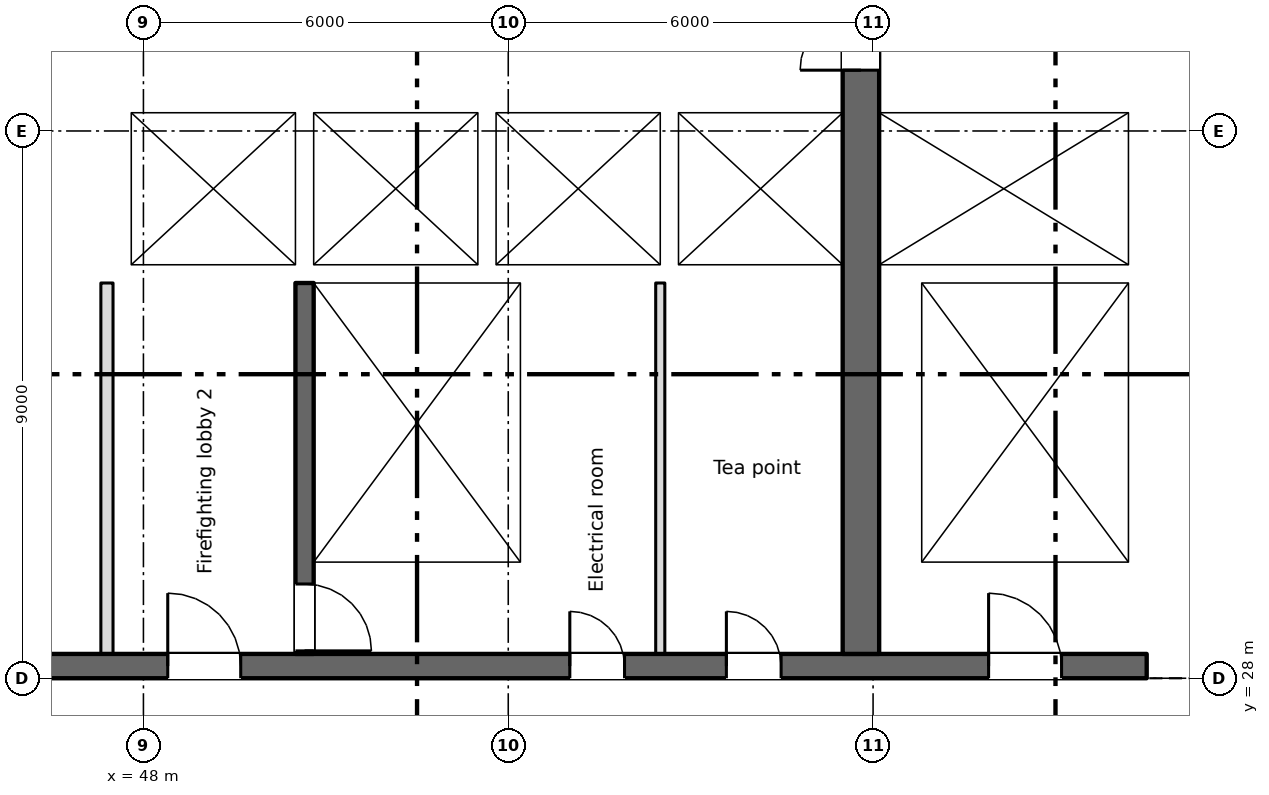
"""IFC4 building model, lengths in metres.
Left out: names, types, materials, properties, quantities, classifications, styles, units other than length and angle.
Written with IfcOpenShell. Run it as: python <this file> out.ifc"""

import sys

from ifc_helpers import new_model, si_unit, direction, frame, frame_2d, origin, place, context, subcontext, project, spatial, rectangle, extrude, element, fill, save


model = new_model("IFC4")
c1 = context("Model", 3, precision=1e-05, world=origin(), true_north=direction((0.0, 1.0)))
c2 = subcontext(c1, "Body", "Model", "MODEL_VIEW")
j1 = project(units=[si_unit("LENGTHUNIT", "METRE"), si_unit("PLANEANGLEUNIT", "RADIAN")], contexts=[c1])
p1 = place(None, origin())
s1 = spatial("IfcSite", under=j1, at=p1, CompositionType="ELEMENT")
p2 = place(p1, origin())
s2 = spatial("IfcBuilding", under=s1, at=p2, CompositionType="ELEMENT")
p3 = place(p2, frame((0.0, 0.0, 235.55)))
s3 = spatial("IfcBuildingStorey", under=s2, at=p3, CompositionType="ELEMENT", Elevation=235.55)
p4 = place(p3, frame((6.5, 28.2, 0.0), z_axis=(0.0, 0.0, 1.0), x_axis=(1.0, 0.0, 0.0)))
e1 = element("IfcWall", 1, at=p4, inside=s3, PredefinedType="SHEAR", context=c2, shape_type="SweptSolid", body=[
    extrude(rectangle(XDim=58.0, YDim=0.4, at=frame_2d((29.0, 0.0))), origin(), (0.0, 0.0, 1.0), 3.4),
])
p5 = place(p4, frame((13.012, 0.0, 0.0)))
e2 = element("IfcOpeningElement", 2, at=p5, cuts=e1, PredefinedType="OPENING", context=c2, shape_type="SweptSolid", body=[
    extrude(rectangle(XDim=0.9, YDim=2.1, at=frame_2d((0.45, 1.05))), frame((0.0, 0.21, 0.0), z_axis=(0.0, -1.0, 0.0), x_axis=(1.0, 0.0, 0.0)), (0.0, 0.0, 1.0), 0.42),
])
p6 = place(p4, frame((15.587, 0.0, 0.0)))
e3 = element("IfcOpeningElement", 3, at=p6, cuts=e1, PredefinedType="OPENING", context=c2, shape_type="SweptSolid", body=[
    extrude(rectangle(XDim=0.9, YDim=2.1, at=frame_2d((0.45, 1.05))), frame((0.0, 0.21, 0.0), z_axis=(0.0, -1.0, 0.0), x_axis=(1.0, 0.0, 0.0)), (0.0, 0.0, 1.0), 0.42),
])
p7 = place(p4, frame((48.512, 0.0, 0.0)))
e4 = element("IfcOpeningElement", 4, at=p7, cuts=e1, PredefinedType="OPENING", context=c2, shape_type="SweptSolid", body=[
    extrude(rectangle(XDim=0.9, YDim=2.1, at=frame_2d((0.45, 1.05))), frame((0.0, 0.21, 0.0), z_axis=(0.0, -1.0, 0.0), x_axis=(1.0, 0.0, 0.0)), (0.0, 0.0, 1.0), 0.42),
])
p8 = place(p4, frame((51.087, 0.0, 0.0)))
e5 = element("IfcOpeningElement", 5, at=p8, cuts=e1, PredefinedType="OPENING", context=c2, shape_type="SweptSolid", body=[
    extrude(rectangle(XDim=0.9, YDim=2.1, at=frame_2d((0.45, 1.05))), frame((0.0, 0.21, 0.0), z_axis=(0.0, -1.0, 0.0), x_axis=(1.0, 0.0, 0.0)), (0.0, 0.0, 1.0), 0.42),
])
p9 = place(p4, frame((0.762, 0.0, 0.0)))
e6 = element("IfcOpeningElement", 6, at=p9, cuts=e1, PredefinedType="OPENING", context=c2, shape_type="SweptSolid", body=[
    extrude(rectangle(XDim=0.9, YDim=2.1, at=frame_2d((0.45, 1.05))), frame((0.0, 0.21, 0.0), z_axis=(0.0, -1.0, 0.0), x_axis=(1.0, 0.0, 0.0)), (0.0, 0.0, 1.0), 0.42),
])
p10 = place(p4, frame((2.337, 0.0, 0.0)))
e7 = element("IfcOpeningElement", 7, at=p10, cuts=e1, PredefinedType="OPENING", context=c2, shape_type="SweptSolid", body=[
    extrude(rectangle(XDim=0.9, YDim=2.1, at=frame_2d((0.45, 1.05))), frame((0.0, 0.21, 0.0), z_axis=(0.0, -1.0, 0.0), x_axis=(1.0, 0.0, 0.0)), (0.0, 0.0, 1.0), 0.42),
])
p11 = place(p4, frame((4.9, 0.0, 0.0)))
e8 = element("IfcOpeningElement", 8, at=p11, cuts=e1, PredefinedType="OPENING", context=c2, shape_type="SweptSolid", body=[
    extrude(rectangle(XDim=1.2, YDim=2.1, at=frame_2d((0.6, 1.05))), frame((0.0, 0.21, 0.0), z_axis=(0.0, -1.0, 0.0), x_axis=(1.0, 0.0, 0.0)), (0.0, 0.0, 1.0), 0.42),
])
p12 = place(p4, frame((31.9, 0.0, 0.0)))
e9 = element("IfcOpeningElement", 9, at=p12, cuts=e1, PredefinedType="OPENING", context=c2, shape_type="SweptSolid", body=[
    extrude(rectangle(XDim=1.2, YDim=2.1, at=frame_2d((0.6, 1.05))), frame((0.0, 0.21, 0.0), z_axis=(0.0, -1.0, 0.0), x_axis=(1.0, 0.0, 0.0)), (0.0, 0.0, 1.0), 0.42),
])
p13 = place(p4, frame((55.4, 0.0, 0.0)))
e10 = element("IfcOpeningElement", 10, at=p13, cuts=e1, PredefinedType="OPENING", context=c2, shape_type="SweptSolid", body=[
    extrude(rectangle(XDim=1.2, YDim=2.1, at=frame_2d((0.6, 1.05))), frame((0.0, 0.21, 0.0), z_axis=(0.0, -1.0, 0.0), x_axis=(1.0, 0.0, 0.0)), (0.0, 0.0, 1.0), 0.42),
])
p14 = place(p4, frame((21.9, 0.0, 0.0)))
e11 = element("IfcOpeningElement", 11, at=p14, cuts=e1, PredefinedType="OPENING", context=c2, shape_type="SweptSolid", body=[
    extrude(rectangle(XDim=1.2, YDim=2.1, at=frame_2d((0.6, 1.05))), frame((0.0, 0.21, 0.0), z_axis=(0.0, -1.0, 0.0), x_axis=(1.0, 0.0, 0.0)), (0.0, 0.0, 1.0), 0.42),
])
p15 = place(p4, frame((41.9, 0.0, 0.0)))
e12 = element("IfcOpeningElement", 12, at=p15, cuts=e1, PredefinedType="OPENING", context=c2, shape_type="SweptSolid", body=[
    extrude(rectangle(XDim=1.2, YDim=2.1, at=frame_2d((0.6, 1.05))), frame((0.0, 0.21, 0.0), z_axis=(0.0, -1.0, 0.0), x_axis=(1.0, 0.0, 0.0)), (0.0, 0.0, 1.0), 0.42),
])
p16 = place(p4, frame((25.05, 0.0, 0.0)))
e13 = element("IfcOpeningElement", 13, at=p16, cuts=e1, PredefinedType="OPENING", context=c2, shape_type="SweptSolid", body=[
    extrude(rectangle(XDim=2.4, YDim=2.1, at=frame_2d((1.2, 1.05))), frame((0.0, 0.21, 0.0), z_axis=(0.0, -1.0, 0.0), x_axis=(1.0, 0.0, 0.0)), (0.0, 0.0, 1.0), 0.42),
])
p17 = place(p4, frame((37.55, 0.0, 0.0)))
e14 = element("IfcOpeningElement", 14, at=p17, cuts=e1, PredefinedType="OPENING", context=c2, shape_type="SweptSolid", body=[
    extrude(rectangle(XDim=2.4, YDim=2.1, at=frame_2d((1.2, 1.05))), frame((0.0, 0.21, 0.0), z_axis=(0.0, -1.0, 0.0), x_axis=(1.0, 0.0, 0.0)), (0.0, 0.0, 1.0), 0.42),
])
p18 = place(p4, frame((8.25, 0.0, 0.0)))
e15 = element("IfcOpeningElement", 15, at=p18, cuts=e1, PredefinedType="OPENING", context=c2, shape_type="SweptSolid", body=[
    extrude(rectangle(XDim=2.4, YDim=2.1, at=frame_2d((1.2, 1.05))), frame((0.0, 0.21, 0.0), z_axis=(0.0, -1.0, 0.0), x_axis=(1.0, 0.0, 0.0)), (0.0, 0.0, 1.0), 0.42),
])
p19 = place(p4, frame((29.05, 0.0, 0.0)))
e16 = element("IfcOpeningElement", 16, at=p19, cuts=e1, PredefinedType="OPENING", context=c2, shape_type="SweptSolid", body=[
    extrude(rectangle(XDim=0.9, YDim=2.1, at=frame_2d((0.45, 1.05))), frame((0.0, 0.21, 0.0), z_axis=(0.0, -1.0, 0.0), x_axis=(1.0, 0.0, 0.0)), (0.0, 0.0, 1.0), 0.42),
])
p20 = place(p4, frame((35.05, 0.0, 0.0)))
e17 = element("IfcOpeningElement", 17, at=p20, cuts=e1, PredefinedType="OPENING", context=c2, shape_type="SweptSolid", body=[
    extrude(rectangle(XDim=0.9, YDim=2.1, at=frame_2d((0.45, 1.05))), frame((0.0, 0.21, 0.0), z_axis=(0.0, -1.0, 0.0), x_axis=(1.0, 0.0, 0.0)), (0.0, 0.0, 1.0), 0.42),
])
p21 = place(p3, frame((64.35, 34.8, 0.0), z_axis=(0.0, 0.0, 1.0), x_axis=(0.0, 1.0, 0.0)))
e18 = element("IfcWall", 18, at=p21, inside=s3, PredefinedType="SHEAR", context=c2, shape_type="SweptSolid", body=[
    extrude(rectangle(XDim=6.45, YDim=0.3, at=frame_2d((3.225, 0.0))), origin(), (0.0, 0.0, 1.0), 3.4),
])
p22 = place(p3, frame((59.8, 28.4, 0.0), z_axis=(0.0, 0.0, 1.0), x_axis=(0.0, 1.0, 0.0)))
e19 = element("IfcWall", 19, at=p22, inside=s3, PredefinedType="SHEAR", context=c2, shape_type="SweptSolid", body=[
    extrude(rectangle(XDim=15.1, YDim=0.6, at=frame_2d((7.55, 0.0))), origin(), (0.0, 0.0, 1.0), 3.4),
])
p23 = place(p22, frame((9.6, 0.0, 0.0)))
e20 = element("IfcOpeningElement", 20, at=p23, cuts=e19, PredefinedType="OPENING", context=c2, shape_type="SweptSolid", body=[
    extrude(rectangle(XDim=2.0, YDim=2.1, at=frame_2d((1.0, 1.05))), frame((0.0, 0.31, 0.0), z_axis=(0.0, -1.0, 0.0), x_axis=(1.0, 0.0, 0.0)), (0.0, 0.0, 1.0), 0.62),
])
p24 = place(p3, frame((50.65, 34.5, 0.0), z_axis=(0.0, 0.0, 1.0), x_axis=(0.0, -1.0, 0.0)))
e21 = element("IfcWall", 21, at=p24, inside=s3, PredefinedType="SHEAR", context=c2, shape_type="SweptSolid", body=[
    extrude(rectangle(XDim=6.1, YDim=0.3, at=frame_2d((3.05, 0.0))), origin(), (0.0, 0.0, 1.0), 3.4),
])
p25 = place(p24, frame((4.95, 0.0, 0.0)))
e22 = element("IfcOpeningElement", 22, at=p25, cuts=e21, PredefinedType="OPENING", context=c2, shape_type="SweptSolid", body=[
    extrude(rectangle(XDim=1.1, YDim=2.1, at=frame_2d((0.55, 1.05))), frame((0.0, 0.16, 0.0), z_axis=(0.0, -1.0, 0.0), x_axis=(1.0, 0.0, 0.0)), (0.0, 0.0, 1.0), 0.32),
])
p26 = place(p3, frame((54.35, 28.4, 0.0), z_axis=(0.0, 0.0, 1.0), x_axis=(0.0, 1.0, 0.0)))
e23 = element("IfcWall", 23, at=p26, inside=s3, PredefinedType="SHEAR", context=c2, shape_type="SweptSolid", body=[
    extrude(rectangle(XDim=6.1, YDim=0.3, at=frame_2d((3.05, 0.0))), origin(), (0.0, 0.0, 1.0), 3.4),
])
p27 = place(p3, frame((60.45, 28.4, 0.0), z_axis=(0.0, 0.0, 1.0), x_axis=(0.0, 1.0, 0.0)))
e24 = element("IfcWall", 24, at=p27, inside=s3, PredefinedType="SHEAR", context=c2, shape_type="SweptSolid", body=[
    extrude(rectangle(XDim=6.1, YDim=0.7, at=frame_2d((3.05, 0.0))), origin(), (0.0, 0.0, 1.0), 3.4),
])
p28 = place(p3, frame((64.35, 28.4, 0.0), z_axis=(0.0, 0.0, 1.0), x_axis=(0.0, 1.0, 0.0)))
e25 = element("IfcWall", 25, at=p28, inside=s3, PredefinedType="SHEAR", context=c2, shape_type="SweptSolid", body=[
    extrude(rectangle(XDim=6.1, YDim=0.3, at=frame_2d((3.05, 0.0))), origin(), (0.0, 0.0, 1.0), 3.4),
])
p29 = place(p3, frame((47.3, 34.65, 0.0), z_axis=(0.0, 0.0, 1.0), x_axis=(1.0, 0.0, 0.0)))
e26 = element("IfcWall", 26, at=p29, inside=s3, PredefinedType="SHEAR", context=c2, shape_type="SweptSolid", body=[
    extrude(rectangle(XDim=12.2, YDim=0.3, at=frame_2d((6.1, 0.0))), origin(), (0.0, 0.0, 1.0), 3.4),
])
p30 = place(p29, frame((1.3, 0.0, 0.0)))
e27 = element("IfcOpeningElement", 27, at=p30, cuts=e26, PredefinedType="OPENING", context=c2, shape_type="SweptSolid", body=[
    extrude(rectangle(XDim=1.1, YDim=2.1, at=frame_2d((0.55, 1.05))), frame((0.0, 0.16, 0.0), z_axis=(0.0, -1.0, 0.0), x_axis=(1.0, 0.0, 0.0)), (0.0, 0.0, 1.0), 0.32),
])
p31 = place(p3, frame((60.1, 34.65, 0.0), z_axis=(0.0, 0.0, 1.0), x_axis=(1.0, 0.0, 0.0)))
e28 = element("IfcWall", 28, at=p31, inside=s3, PredefinedType="SHEAR", context=c2, shape_type="SweptSolid", body=[
    extrude(rectangle(XDim=4.4, YDim=0.3, at=frame_2d((2.2, 0.0))), origin(), (0.0, 0.0, 1.0), 3.4),
])
p32 = place(p3, frame((47.3, 37.45, 0.0), z_axis=(0.0, 0.0, 1.0), x_axis=(1.0, 0.0, 0.0)))
e29 = element("IfcWall", 29, at=p32, inside=s3, PredefinedType="SHEAR", context=c2, shape_type="SweptSolid", body=[
    extrude(rectangle(XDim=12.2, YDim=0.3, at=frame_2d((6.1, 0.0))), origin(), (0.0, 0.0, 1.0), 3.4),
])
p33 = place(p32, frame((4.3, 0.0, 0.0)))
e30 = element("IfcOpeningElement", 30, at=p33, cuts=e29, PredefinedType="OPENING", context=c2, shape_type="SweptSolid", body=[
    extrude(rectangle(XDim=1.1, YDim=2.1, at=frame_2d((0.55, 1.05))), frame((0.0, 0.16, 0.0), z_axis=(0.0, -1.0, 0.0), x_axis=(1.0, 0.0, 0.0)), (0.0, 0.0, 1.0), 0.32),
])
p34 = place(p32, frame((7.3, 0.0, 0.0)))
e31 = element("IfcOpeningElement", 31, at=p34, cuts=e29, PredefinedType="OPENING", context=c2, shape_type="SweptSolid", body=[
    extrude(rectangle(XDim=1.1, YDim=2.1, at=frame_2d((0.55, 1.05))), frame((0.0, 0.16, 0.0), z_axis=(0.0, -1.0, 0.0), x_axis=(1.0, 0.0, 0.0)), (0.0, 0.0, 1.0), 0.32),
])
p35 = place(p32, frame((10.3, 0.0, 0.0)))
e32 = element("IfcOpeningElement", 32, at=p35, cuts=e29, PredefinedType="OPENING", context=c2, shape_type="SweptSolid", body=[
    extrude(rectangle(XDim=1.1, YDim=2.1, at=frame_2d((0.55, 1.05))), frame((0.0, 0.16, 0.0), z_axis=(0.0, -1.0, 0.0), x_axis=(1.0, 0.0, 0.0)), (0.0, 0.0, 1.0), 0.32),
])
p36 = place(p3, frame((60.1, 37.45, 0.0), z_axis=(0.0, 0.0, 1.0), x_axis=(1.0, 0.0, 0.0)))
e33 = element("IfcWall", 33, at=p36, inside=s3, PredefinedType="SHEAR", context=c2, shape_type="SweptSolid", body=[
    extrude(rectangle(XDim=4.1, YDim=0.3, at=frame_2d((2.05, 0.0))), origin(), (0.0, 0.0, 1.0), 3.4),
])
p37 = place(p36, frame((1.5, 0.0, 0.0)))
e34 = element("IfcOpeningElement", 34, at=p37, cuts=e33, PredefinedType="OPENING", context=c2, shape_type="SweptSolid", body=[
    extrude(rectangle(XDim=1.1, YDim=2.1, at=frame_2d((0.55, 1.05))), frame((0.0, 0.16, 0.0), z_axis=(0.0, -1.0, 0.0), x_axis=(1.0, 0.0, 0.0)), (0.0, 0.0, 1.0), 0.32),
])
p38 = place(p3, frame((47.55, 34.8, 0.0), z_axis=(0.0, 0.0, 1.0), x_axis=(0.0, 1.0, 0.0)))
e35 = element("IfcWall", 35, at=p38, inside=s3, PredefinedType="SHEAR", context=c2, shape_type="SweptSolid", body=[
    extrude(rectangle(XDim=2.5, YDim=0.5, at=frame_2d((1.25, 0.0))), origin(), (0.0, 0.0, 1.0), 3.4),
])
for number, where, z_axis, x_axis in (
    (36, (50.65, 34.8, 0.0), (0.0, 0.0, 1.0), (0.0, 1.0, 0.0)),
    (37, (53.65, 34.8, 0.0), (0.0, 0.0, 1.0), (0.0, 1.0, 0.0)),
    (38, (56.65, 34.8, 0.0), (0.0, 0.0, 1.0), (0.0, 1.0, 0.0)),
):
    element("IfcWall", number, at=place(p3, frame(where, z_axis=z_axis, x_axis=x_axis)), inside=s3, PredefinedType="SHEAR", context=c2, shape_type="SweptSolid", body=[
        extrude(rectangle(XDim=2.5, YDim=0.3, at=frame_2d((1.25, 0.0))), origin(), (0.0, 0.0, 1.0), 3.4),
    ])
p39 = place(p3, frame((47.4, 28.4, 0.0), z_axis=(0.0, 0.0, 1.0), x_axis=(0.0, 1.0, 0.0)))
e39 = element("IfcWall", 39, at=p39, inside=s3, PredefinedType="PARTITIONING", context=c2, shape_type="SweptSolid", body=[
    extrude(rectangle(XDim=6.1, YDim=0.2, at=frame_2d((3.05, 0.0))), origin(), (0.0, 0.0, 1.0), 3.4),
])
p40 = place(p3, frame((56.5, 28.4, 0.0), z_axis=(0.0, 0.0, 1.0), x_axis=(0.0, 1.0, 0.0)))
e40 = element("IfcWall", 40, at=p40, inside=s3, PredefinedType="PARTITIONING", context=c2, shape_type="SweptSolid", body=[
    extrude(rectangle(XDim=6.1, YDim=0.15, at=frame_2d((3.05, 0.0))), origin(), (0.0, 0.0, 1.0), 3.4),
])
p41 = place(p7, origin())
e41 = element("IfcDoor", 41, at=p41, inside=s3, OperationType="SINGLE_SWING_LEFT", PredefinedType="DOOR", context=c2, shape_type="SweptSolid", body=[
    extrude(rectangle(XDim=0.9, YDim=2.1, at=frame_2d((0.45, 1.05))), frame((0.0, 0.025, 0.0), z_axis=(0.0, -1.0, 0.0), x_axis=(1.0, 0.0, 0.0)), (0.0, 0.0, 1.0), 0.05),
])
fill(e4, e41)
p42 = place(p8, origin())
e42 = element("IfcDoor", 42, at=p42, inside=s3, OperationType="SINGLE_SWING_LEFT", PredefinedType="DOOR", context=c2, shape_type="SweptSolid", body=[
    extrude(rectangle(XDim=0.9, YDim=2.1, at=frame_2d((0.45, 1.05))), frame((0.0, 0.025, 0.0), z_axis=(0.0, -1.0, 0.0), x_axis=(1.0, 0.0, 0.0)), (0.0, 0.0, 1.0), 0.05),
])
fill(e5, e42)
p43 = place(p33, origin())
e43 = element("IfcDoor", 43, at=p43, inside=s3, OperationType="SLIDING_TO_LEFT", PredefinedType="DOOR", context=c2, shape_type="SweptSolid", body=[
    extrude(rectangle(XDim=1.1, YDim=2.1, at=frame_2d((0.55, 1.05))), frame((0.0, 0.025, 0.0), z_axis=(0.0, -1.0, 0.0), x_axis=(1.0, 0.0, 0.0)), (0.0, 0.0, 1.0), 0.05),
])
fill(e30, e43)
p44 = place(p34, origin())
e44 = element("IfcDoor", 44, at=p44, inside=s3, OperationType="SLIDING_TO_LEFT", PredefinedType="DOOR", context=c2, shape_type="SweptSolid", body=[
    extrude(rectangle(XDim=1.1, YDim=2.1, at=frame_2d((0.55, 1.05))), frame((0.0, 0.025, 0.0), z_axis=(0.0, -1.0, 0.0), x_axis=(1.0, 0.0, 0.0)), (0.0, 0.0, 1.0), 0.05),
])
fill(e31, e44)
p45 = place(p35, origin())
e45 = element("IfcDoor", 45, at=p45, inside=s3, OperationType="SLIDING_TO_LEFT", PredefinedType="DOOR", context=c2, shape_type="SweptSolid", body=[
    extrude(rectangle(XDim=1.1, YDim=2.1, at=frame_2d((0.55, 1.05))), frame((0.0, 0.025, 0.0), z_axis=(0.0, -1.0, 0.0), x_axis=(1.0, 0.0, 0.0)), (0.0, 0.0, 1.0), 0.05),
])
fill(e32, e45)
p46 = place(p37, origin())
e46 = element("IfcDoor", 46, at=p46, inside=s3, OperationType="SLIDING_TO_LEFT", PredefinedType="DOOR", context=c2, shape_type="SweptSolid", body=[
    extrude(rectangle(XDim=1.1, YDim=2.1, at=frame_2d((0.55, 1.05))), frame((0.0, 0.025, 0.0), z_axis=(0.0, -1.0, 0.0), x_axis=(1.0, 0.0, 0.0)), (0.0, 0.0, 1.0), 0.05),
])
fill(e34, e46)
p47 = place(p30, origin())
e47 = element("IfcDoor", 47, at=p47, inside=s3, OperationType="SLIDING_TO_LEFT", PredefinedType="DOOR", context=c2, shape_type="SweptSolid", body=[
    extrude(rectangle(XDim=1.1, YDim=2.1, at=frame_2d((0.55, 1.05))), frame((0.0, 0.025, 0.0), z_axis=(0.0, -1.0, 0.0), x_axis=(1.0, 0.0, 0.0)), (0.0, 0.0, 1.0), 0.05),
])
fill(e27, e47)
p48 = place(p25, origin())
e48 = element("IfcDoor", 48, at=p48, inside=s3, OperationType="SINGLE_SWING_RIGHT", PredefinedType="DOOR", context=c2, shape_type="SweptSolid", body=[
    extrude(rectangle(XDim=1.1, YDim=2.1, at=frame_2d((0.55, 1.05))), frame((0.0, 0.025, 0.0), z_axis=(0.0, -1.0, 0.0), x_axis=(1.0, 0.0, 0.0)), (0.0, 0.0, 1.0), 0.05),
])
fill(e22, e48)
p49 = place(p13, origin())
e49 = element("IfcDoor", 49, at=p49, inside=s3, OperationType="SINGLE_SWING_LEFT", PredefinedType="DOOR", context=c2, shape_type="SweptSolid", body=[
    extrude(rectangle(XDim=1.2, YDim=2.1, at=frame_2d((0.6, 1.05))), frame((0.0, 0.025, 0.0), z_axis=(0.0, -1.0, 0.0), x_axis=(1.0, 0.0, 0.0)), (0.0, 0.0, 1.0), 0.05),
])
fill(e10, e49)
p50 = place(p15, origin())
e50 = element("IfcDoor", 50, at=p50, inside=s3, OperationType="SINGLE_SWING_LEFT", PredefinedType="DOOR", context=c2, shape_type="SweptSolid", body=[
    extrude(rectangle(XDim=1.2, YDim=2.1, at=frame_2d((0.6, 1.05))), frame((0.0, 0.025, 0.0), z_axis=(0.0, -1.0, 0.0), x_axis=(1.0, 0.0, 0.0)), (0.0, 0.0, 1.0), 0.05),
])
fill(e12, e50)
p51 = place(p23, origin())
e51 = element("IfcDoor", 51, at=p51, inside=s3, OperationType="DOUBLE_DOOR_SINGLE_SWING", PredefinedType="DOOR", context=c2, shape_type="SweptSolid", body=[
    extrude(rectangle(XDim=2.0, YDim=2.1, at=frame_2d((1.0, 1.05))), frame((0.0, 0.025, 0.0), z_axis=(0.0, -1.0, 0.0), x_axis=(1.0, 0.0, 0.0)), (0.0, 0.0, 1.0), 0.05),
])
fill(e20, e51)
save(model, sys.argv[1])
